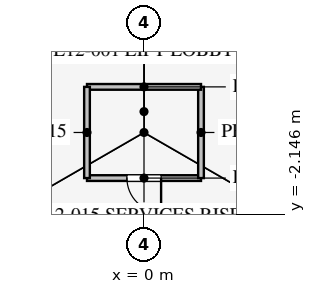
"""IFC4 building model, lengths in metres.
Left out: names, types, materials, properties, quantities, classifications, styles, units other than length and angle.
Written with IfcOpenShell. Run it as: python <this file> out.ifc"""

import sys

from ifc_helpers import new_model, si_unit, direction, frame, frame_2d, origin, place, context, subcontext, project, spatial, rectangle, extrude, element, fill, save


model = new_model("IFC4")
c1 = context("Model", 3, precision=1e-05, world=origin(), true_north=direction((0.0, 1.0)))
c2 = subcontext(c1, "Body", "Model", "MODEL_VIEW")
j1 = project(units=[si_unit("LENGTHUNIT", "METRE"), si_unit("PLANEANGLEUNIT", "RADIAN")], contexts=[c1])
p1 = place(None, origin())
s1 = spatial("IfcSite", under=j1, at=p1, CompositionType="ELEMENT")
p2 = place(p1, origin())
s2 = spatial("IfcBuilding", under=s1, at=p2, CompositionType="ELEMENT")
p3 = place(p2, frame((0.0, 0.0, 54.3)))
s3 = spatial("IfcBuildingStorey", under=s2, at=p3, CompositionType="ELEMENT", Elevation=54.3)
p4 = place(p3, frame((-1.5, -1.2, 0.0), z_axis=(0.0, 0.0, 1.0), x_axis=(1.0, 0.0, 0.0)))
e1 = element("IfcWall", 1, at=p4, inside=s3, PredefinedType="PARTITIONING", context=c2, shape_type="SweptSolid", body=[
    extrude(rectangle(XDim=3.0, YDim=0.15, at=frame_2d((1.5, 0.0))), origin(), (0.0, 0.0, 1.0), 4.0),
])
p5 = place(p4, frame((1.05, 0.0, 0.0)))
e2 = element("IfcOpeningElement", 2, at=p5, cuts=e1, PredefinedType="OPENING", context=c2, shape_type="SweptSolid", body=[
    extrude(rectangle(XDim=0.9, YDim=2.1, at=frame_2d((0.45, 1.05))), frame((0.0, 0.085, 0.0), z_axis=(0.0, -1.0, 0.0), x_axis=(1.0, 0.0, 0.0)), (0.0, 0.0, 1.0), 0.17),
])
p6 = place(p3, frame((1.5, -1.2, 0.0), z_axis=(0.0, 0.0, 1.0), x_axis=(0.0, 1.0, 0.0)))
e3 = element("IfcWall", 3, at=p6, inside=s3, PredefinedType="PARTITIONING", context=c2, shape_type="SweptSolid", body=[
    extrude(rectangle(XDim=2.4, YDim=0.15, at=frame_2d((1.2, 0.0))), origin(), (0.0, 0.0, 1.0), 4.0),
])
p7 = place(p3, frame((1.5, 1.2, 0.0), z_axis=(0.0, 0.0, 1.0), x_axis=(-1.0, 0.0, 0.0)))
e4 = element("IfcWall", 4, at=p7, inside=s3, PredefinedType="PARTITIONING", context=c2, shape_type="SweptSolid", body=[
    extrude(rectangle(XDim=3.0, YDim=0.15, at=frame_2d((1.5, 0.0))), origin(), (0.0, 0.0, 1.0), 4.0),
])
p8 = place(p3, frame((-1.5, 1.2, 0.0), z_axis=(0.0, 0.0, 1.0), x_axis=(0.0, -1.0, 0.0)))
e5 = element("IfcWall", 5, at=p8, inside=s3, PredefinedType="PARTITIONING", context=c2, shape_type="SweptSolid", body=[
    extrude(rectangle(XDim=2.4, YDim=0.15, at=frame_2d((1.2, 0.0))), origin(), (0.0, 0.0, 1.0), 4.0),
])
p9 = place(p3, frame((-0.016, 30.491, 0.0), z_axis=(0.0, 0.0, 1.0), x_axis=(-0.50000091641, -0.866024874695, 0.0)))
e6 = element("IfcWall", 6, at=p9, inside=s3, PredefinedType="PARTITIONING", context=c2, shape_type="SweptSolid", body=[
    extrude(rectangle(XDim=52.796, YDim=0.12, at=frame_2d((26.398, 0.0))), origin(), (0.0, 0.0, 1.0), 2.9),
])
p10 = place(p9, frame((10.2, 0.0, 0.15)))
e7 = element("IfcOpeningElement", 7, at=p10, cuts=e6, PredefinedType="OPENING", context=c2, shape_type="SweptSolid", body=[
    extrude(rectangle(XDim=1.8, YDim=2.1, at=frame_2d((0.9, 1.05))), frame((0.0, 0.07, 0.0), z_axis=(0.0, -1.0, 0.0), x_axis=(1.0, 0.0, 0.0)), (0.0, 0.0, 1.0), 0.14),
])
p11 = place(p9, frame((40.8, 0.0, 0.15)))
e8 = element("IfcOpeningElement", 8, at=p11, cuts=e6, PredefinedType="OPENING", context=c2, shape_type="SweptSolid", body=[
    extrude(rectangle(XDim=1.8, YDim=2.1, at=frame_2d((0.9, 1.05))), frame((0.0, 0.07, 0.0), z_axis=(0.0, -1.0, 0.0), x_axis=(1.0, 0.0, 0.0)), (0.0, 0.0, 1.0), 0.14),
])
p12 = place(p5, frame((0.9, 0.0, 0.0), z_axis=(0.0, 0.0, 1.0), x_axis=(-1.0, 0.0, 0.0)))
e9 = element("IfcDoor", 9, at=p12, inside=s3, OperationType="SINGLE_SWING_LEFT", PredefinedType="DOOR", context=c2, shape_type="SweptSolid", body=[
    extrude(rectangle(XDim=0.9, YDim=2.1, at=frame_2d((0.45, 1.05))), frame((0.0, 0.025, 0.0), z_axis=(0.0, -1.0, 0.0), x_axis=(1.0, 0.0, 0.0)), (0.0, 0.0, 1.0), 0.05),
])
fill(e2, e9)
save(model, sys.argv[1])
